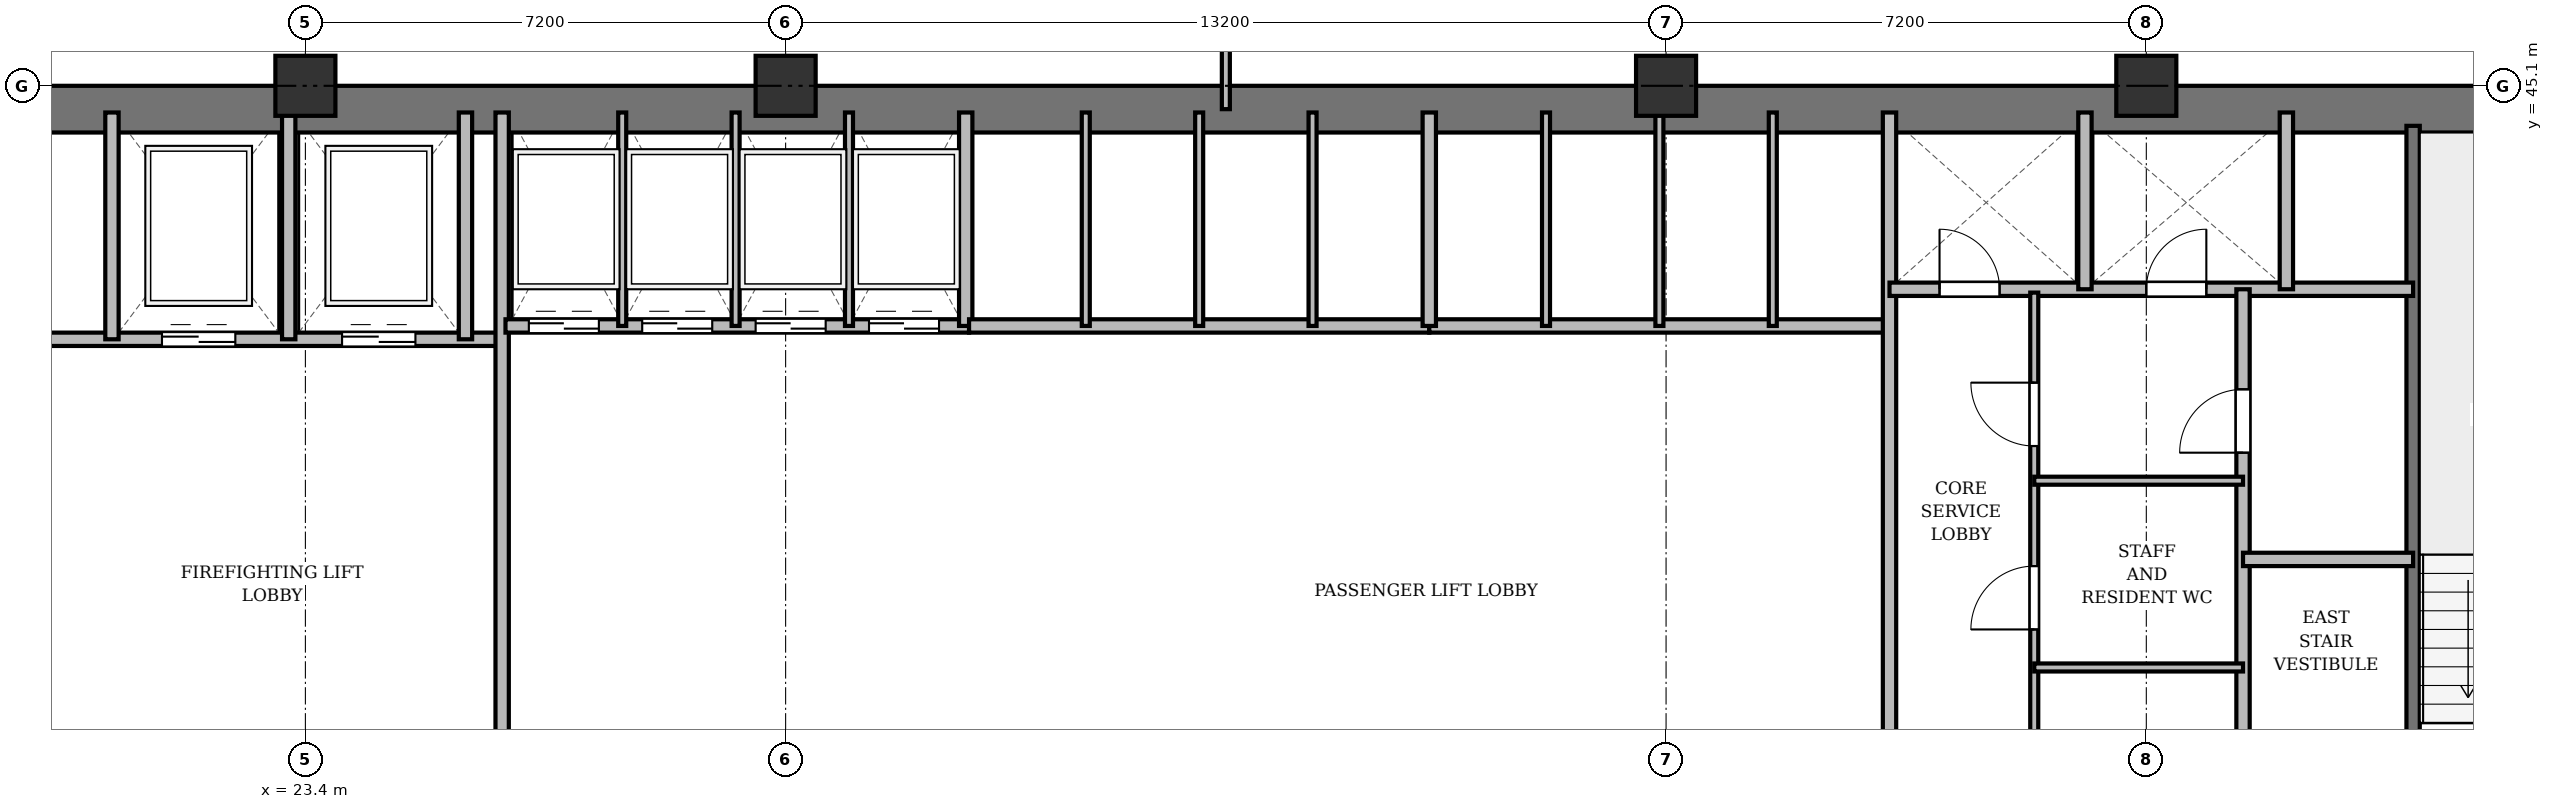
"""IFC4 building model, lengths in metres.
Left out: names, types, materials, properties, quantities, classifications, styles, units other than length and angle.
Written with IfcOpenShell. Run it as: python <this file> out.ifc"""

import sys

from ifc_helpers import new_model, si_unit, direction, frame, frame_2d, origin, origin_2d, place, context, subcontext, project, spatial, rectangle, extrude, source, transform, mapped, element, fill, save


model = new_model("IFC4")
c1 = context("Model", 3, precision=1e-05, world=origin(), true_north=direction((0.0, 1.0)))
c2 = subcontext(c1, "Body", "Model", "MODEL_VIEW")
j1 = project(units=[si_unit("LENGTHUNIT", "METRE"), si_unit("PLANEANGLEUNIT", "RADIAN")], contexts=[c1])
p1 = place(None, origin())
s1 = spatial("IfcSite", under=j1, at=p1, CompositionType="ELEMENT")
p2 = place(p1, origin())
s2 = spatial("IfcBuilding", under=s1, at=p2, CompositionType="ELEMENT")
p3 = place(p2, frame((0.0, 0.0, 30.7)))
s3 = spatial("IfcBuildingStorey", under=s2, at=p3, CompositionType="ELEMENT", Elevation=30.7)
m1 = source(origin(), c2, "Body", "SweptSolid", [
    extrude(rectangle(XDim=0.9, YDim=0.9, at=origin_2d()), origin(), (0.0, 0.0, 1.0), 3.6),
])
for number, where, z_axis, x_axis in (
    (1, (23.4, 45.1, 0.0), (0.0, 0.0, 1.0), (1.0, 0.0, 0.0)),
    (2, (30.6, 45.1, 0.0), (0.0, 0.0, 1.0), (1.0, 0.0, 0.0)),
    (3, (43.8, 45.1, 0.0), (0.0, 0.0, 1.0), (1.0, 0.0, 0.0)),
    (4, (51.0, 45.1, 0.0), (0.0, 0.0, 1.0), (1.0, 0.0, 0.0)),
):
    element("IfcColumn", number, at=place(p3, frame(where, z_axis=z_axis, x_axis=x_axis)), inside=s3, PredefinedType="COLUMN", context=c2, shape_type="MappedRepresentation", body=[
        mapped(m1, transform((0.0, 0.0, 0.0), x_axis=(1.0, 0.0, 0.0), y_axis=(0.0, 1.0, 0.0), z_axis=(0.0, 0.0, 1.0), scale=1.0)),
    ])
p4 = place(p3, frame((15.5, 44.75, 0.0), z_axis=(0.0, 0.0, 1.0), x_axis=(1.0, 0.0, 0.0)))
e5 = element("IfcWall", 5, at=p4, inside=s3, PredefinedType="SHEAR", context=c2, shape_type="SweptSolid", body=[
    extrude(rectangle(XDim=43.4, YDim=0.7, at=frame_2d((21.7, 0.0))), origin(), (0.0, 0.0, 1.0), 3.34),
])
p5 = place(p3, frame((55.0, 33.4, 0.0), z_axis=(0.0, 0.0, 1.0), x_axis=(0.0, 1.0, 0.0)))
e6 = element("IfcWall", 6, at=p5, inside=s3, PredefinedType="SHEAR", context=c2, shape_type="SweptSolid", body=[
    extrude(rectangle(XDim=11.1, YDim=0.2, at=frame_2d((5.55, 0.0))), origin(), (0.0, 0.0, 1.0), 3.34),
])
p6 = place(p5, frame((0.85, 0.0, 0.0)))
e7 = element("IfcOpeningElement", 7, at=p6, cuts=e6, PredefinedType="OPENING", context=c2, shape_type="SweptSolid", body=[
    extrude(rectangle(XDim=1.1, YDim=2.15, at=frame_2d((0.55, 1.075))), frame((0.0, 0.11, 0.0), z_axis=(0.0, -1.0, 0.0), x_axis=(1.0, 0.0, 0.0)), (0.0, 0.0, 1.0), 0.22),
])
p7 = place(p3, frame((19.55, 41.3, 0.0), z_axis=(0.0, 0.0, 1.0), x_axis=(1.0, 0.0, 0.0)))
e8 = element("IfcWall", 8, at=p7, inside=s3, PredefinedType="SOLIDWALL", context=c2, shape_type="SweptSolid", body=[
    extrude(rectangle(XDim=6.75, YDim=0.2, at=frame_2d((3.375, 0.0))), origin(), (0.0, 0.0, 1.0), 3.34),
])
p8 = place(p7, frame((1.7, 0.0, 0.0)))
e9 = element("IfcOpeningElement", 9, at=p8, cuts=e8, PredefinedType="OPENING", context=c2, shape_type="SweptSolid", body=[
    extrude(rectangle(XDim=1.1, YDim=2.15, at=frame_2d((0.55, 1.075))), frame((0.0, 0.11, 0.0), z_axis=(0.0, -1.0, 0.0), x_axis=(1.0, 0.0, 0.0)), (0.0, 0.0, 1.0), 0.22),
])
p9 = place(p7, frame((4.4, 0.0, 0.0)))
e10 = element("IfcOpeningElement", 10, at=p9, cuts=e8, PredefinedType="OPENING", context=c2, shape_type="SweptSolid", body=[
    extrude(rectangle(XDim=1.1, YDim=2.15, at=frame_2d((0.55, 1.075))), frame((0.0, 0.11, 0.0), z_axis=(0.0, -1.0, 0.0), x_axis=(1.0, 0.0, 0.0)), (0.0, 0.0, 1.0), 0.22),
])
for number, where, z_axis, x_axis in (
    (11, (20.5, 41.3, 0.0), (0.0, 0.0, 1.0), (0.0, 1.0, 0.0)),
    (12, (23.15, 41.3, 0.0), (0.0, 0.0, 1.0), (0.0, 1.0, 0.0)),
    (13, (25.8, 41.3, 0.0), (0.0, 0.0, 1.0), (0.0, 1.0, 0.0)),
):
    element("IfcWall", number, at=place(p3, frame(where, z_axis=z_axis, x_axis=x_axis)), inside=s3, PredefinedType="SOLIDWALL", context=c2, shape_type="SweptSolid", body=[
        extrude(rectangle(XDim=3.4, YDim=0.2, at=frame_2d((1.7, 0.0))), origin(), (0.0, 0.0, 1.0), 3.34),
    ])
p10 = place(p3, frame((26.35, 33.4, 0.0), z_axis=(0.0, 0.0, 1.0), x_axis=(0.0, 1.0, 0.0)))
e14 = element("IfcWall", 14, at=p10, inside=s3, PredefinedType="SOLIDWALL", context=c2, shape_type="SweptSolid", body=[
    extrude(rectangle(XDim=11.3, YDim=0.2, at=frame_2d((5.65, 0.0))), origin(), (0.0, 0.0, 1.0), 2.69),
])
p11 = place(p3, frame((26.4, 41.5, 0.0), z_axis=(0.0, 0.0, 1.0), x_axis=(1.0, 0.0, 0.0)))
e15 = element("IfcWall", 15, at=p11, inside=s3, PredefinedType="SOLIDWALL", context=c2, shape_type="SweptSolid", body=[
    extrude(rectangle(XDim=6.95, YDim=0.2, at=frame_2d((3.475, 0.0))), origin(), (0.0, 0.0, 1.0), 3.34),
])
p12 = place(p11, frame((0.35, 0.0, 0.0)))
e16 = element("IfcOpeningElement", 16, at=p12, cuts=e15, PredefinedType="OPENING", context=c2, shape_type="SweptSolid", body=[
    extrude(rectangle(XDim=1.05, YDim=2.15, at=frame_2d((0.525, 1.075))), frame((0.0, 0.11, 0.0), z_axis=(0.0, -1.0, 0.0), x_axis=(1.0, 0.0, 0.0)), (0.0, 0.0, 1.0), 0.22),
])
p13 = place(p11, frame((2.05, 0.0, 0.0)))
e17 = element("IfcOpeningElement", 17, at=p13, cuts=e15, PredefinedType="OPENING", context=c2, shape_type="SweptSolid", body=[
    extrude(rectangle(XDim=1.05, YDim=2.15, at=frame_2d((0.525, 1.075))), frame((0.0, 0.11, 0.0), z_axis=(0.0, -1.0, 0.0), x_axis=(1.0, 0.0, 0.0)), (0.0, 0.0, 1.0), 0.22),
])
p14 = place(p11, frame((3.75, 0.0, 0.0)))
e18 = element("IfcOpeningElement", 18, at=p14, cuts=e15, PredefinedType="OPENING", context=c2, shape_type="SweptSolid", body=[
    extrude(rectangle(XDim=1.05, YDim=2.15, at=frame_2d((0.525, 1.075))), frame((0.0, 0.11, 0.0), z_axis=(0.0, -1.0, 0.0), x_axis=(1.0, 0.0, 0.0)), (0.0, 0.0, 1.0), 0.22),
])
p15 = place(p11, frame((5.45, 0.0, 0.0)))
e19 = element("IfcOpeningElement", 19, at=p15, cuts=e15, PredefinedType="OPENING", context=c2, shape_type="SweptSolid", body=[
    extrude(rectangle(XDim=1.05, YDim=2.15, at=frame_2d((0.525, 1.075))), frame((0.0, 0.11, 0.0), z_axis=(0.0, -1.0, 0.0), x_axis=(1.0, 0.0, 0.0)), (0.0, 0.0, 1.0), 0.22),
])
p16 = place(p3, frame((33.3, 41.5, 0.0), z_axis=(0.0, 0.0, 1.0), x_axis=(0.0, 1.0, 0.0)))
e20 = element("IfcWall", 20, at=p16, inside=s3, PredefinedType="SOLIDWALL", context=c2, shape_type="SweptSolid", body=[
    extrude(rectangle(XDim=3.2, YDim=0.2, at=frame_2d((1.6, 0.0))), origin(), (0.0, 0.0, 1.0), 3.34),
])
for number, where, z_axis, x_axis in (
    (21, (28.15, 41.5, 0.0), (0.0, 0.0, 1.0), (0.0, 1.0, 0.0)),
    (22, (29.85, 41.5, 0.0), (0.0, 0.0, 1.0), (0.0, 1.0, 0.0)),
    (23, (31.55, 41.5, 0.0), (0.0, 0.0, 1.0), (0.0, 1.0, 0.0)),
):
    element("IfcWall", number, at=place(p3, frame(where, z_axis=z_axis, x_axis=x_axis)), inside=s3, PredefinedType="PARTITIONING", context=c2, shape_type="SweptSolid", body=[
        extrude(rectangle(XDim=3.2, YDim=0.12, at=frame_2d((1.6, 0.0))), origin(), (0.0, 0.0, 1.0), 3.34),
    ])
p17 = place(p3, frame((33.35, 41.5, 0.0), z_axis=(0.0, 0.0, 1.0), x_axis=(1.0, 0.0, 0.0)))
e24 = element("IfcWall", 24, at=p17, inside=s3, PredefinedType="SOLIDWALL", context=c2, shape_type="SweptSolid", body=[
    extrude(rectangle(XDim=6.9, YDim=0.2, at=frame_2d((3.45, 0.0))), origin(), (0.0, 0.0, 1.0), 3.34),
])
for number, where, z_axis, x_axis in (
    (25, (35.1, 41.5, 0.0), (0.0, 0.0, 1.0), (0.0, 1.0, 0.0)),
    (26, (36.8, 41.5, 0.0), (0.0, 0.0, 1.0), (0.0, 1.0, 0.0)),
    (27, (38.5, 41.5, 0.0), (0.0, 0.0, 1.0), (0.0, 1.0, 0.0)),
):
    element("IfcWall", number, at=place(p3, frame(where, z_axis=z_axis, x_axis=x_axis)), inside=s3, PredefinedType="PARTITIONING", context=c2, shape_type="SweptSolid", body=[
        extrude(rectangle(XDim=3.2, YDim=0.12, at=frame_2d((1.6, 0.0))), origin(), (0.0, 0.0, 1.0), 3.34),
    ])
p18 = place(p3, frame((40.25, 41.5, 0.0), z_axis=(0.0, 0.0, 1.0), x_axis=(1.0, 0.0, 0.0)))
e28 = element("IfcWall", 28, at=p18, inside=s3, PredefinedType="SOLIDWALL", context=c2, shape_type="SweptSolid", body=[
    extrude(rectangle(XDim=6.9, YDim=0.2, at=frame_2d((3.45, 0.0))), origin(), (0.0, 0.0, 1.0), 2.752),
])
p19 = place(p3, frame((40.25, 41.5, 0.0), z_axis=(0.0, 0.0, 1.0), x_axis=(0.0, 1.0, 0.0)))
e29 = element("IfcWall", 29, at=p19, inside=s3, PredefinedType="SOLIDWALL", context=c2, shape_type="SweptSolid", body=[
    extrude(rectangle(XDim=3.2, YDim=0.2, at=frame_2d((1.6, 0.0))), origin(), (0.0, 0.0, 1.0), 3.34),
])
p20 = place(p3, frame((42.0, 41.5, 0.0), z_axis=(0.0, 0.0, 1.0), x_axis=(0.0, 1.0, 0.0)))
e30 = element("IfcWall", 30, at=p20, inside=s3, PredefinedType="PARTITIONING", context=c2, shape_type="SweptSolid", body=[
    extrude(rectangle(XDim=3.2, YDim=0.12, at=frame_2d((1.6, 0.0))), origin(), (0.0, 0.0, 1.0), 3.34),
])
p21 = place(p3, frame((43.7, 41.5, 0.0), z_axis=(0.0, 0.0, 1.0), x_axis=(0.0, 1.0, 0.0)))
e31 = element("IfcWall", 31, at=p21, inside=s3, PredefinedType="PARTITIONING", context=c2, shape_type="SweptSolid", body=[
    extrude(rectangle(XDim=3.2, YDim=0.12, at=frame_2d((1.6, 0.0))), origin(), (0.0, 0.0, 1.0), 2.752),
])
p22 = place(p3, frame((45.4, 41.5, 0.0), z_axis=(0.0, 0.0, 1.0), x_axis=(0.0, 1.0, 0.0)))
e32 = element("IfcWall", 32, at=p22, inside=s3, PredefinedType="PARTITIONING", context=c2, shape_type="SweptSolid", body=[
    extrude(rectangle(XDim=3.2, YDim=0.12, at=frame_2d((1.6, 0.0))), origin(), (0.0, 0.0, 1.0), 3.34),
])
p23 = place(p3, frame((47.15, 33.4, 0.0), z_axis=(0.0, 0.0, 1.0), x_axis=(0.0, 1.0, 0.0)))
e33 = element("IfcWall", 33, at=p23, inside=s3, PredefinedType="SOLIDWALL", context=c2, shape_type="SweptSolid", body=[
    extrude(rectangle(XDim=11.3, YDim=0.2, at=frame_2d((5.65, 0.0))), origin(), (0.0, 0.0, 1.0), 2.69),
])
p24 = place(p3, frame((47.15, 42.05, 0.0), z_axis=(0.0, 0.0, 1.0), x_axis=(1.0, 0.0, 0.0)))
e34 = element("IfcWall", 34, at=p24, inside=s3, PredefinedType="SOLIDWALL", context=c2, shape_type="SweptSolid", body=[
    extrude(rectangle(XDim=7.85, YDim=0.2, at=frame_2d((3.925, 0.0))), origin(), (0.0, 0.0, 1.0), 2.752),
])
p25 = place(p24, frame((0.75, 0.0, 0.0)))
e35 = element("IfcOpeningElement", 35, at=p25, cuts=e34, PredefinedType="OPENING", context=c2, shape_type="SweptSolid", body=[
    extrude(rectangle(XDim=0.9, YDim=2.1, at=frame_2d((0.45, 1.05))), frame((0.0, 0.11, 0.0), z_axis=(0.0, -1.0, 0.0), x_axis=(1.0, 0.0, 0.0)), (0.0, 0.0, 1.0), 0.22),
])
p26 = place(p24, frame((3.85, 0.0, 0.0)))
e36 = element("IfcOpeningElement", 36, at=p26, cuts=e34, PredefinedType="OPENING", context=c2, shape_type="SweptSolid", body=[
    extrude(rectangle(XDim=0.9, YDim=2.1, at=frame_2d((0.45, 1.05))), frame((0.0, 0.11, 0.0), z_axis=(0.0, -1.0, 0.0), x_axis=(1.0, 0.0, 0.0)), (0.0, 0.0, 1.0), 0.22),
])
for number, where, z_axis, x_axis in (
    (37, (50.08, 42.05, 0.0), (0.0, 0.0, 1.0), (0.0, 1.0, 0.0)),
    (38, (53.1, 42.05, 0.0), (0.0, 0.0, 1.0), (0.0, 1.0, 0.0)),
):
    element("IfcWall", number, at=place(p3, frame(where, z_axis=z_axis, x_axis=x_axis)), inside=s3, PredefinedType="SOLIDWALL", context=c2, shape_type="SweptSolid", body=[
        extrude(rectangle(XDim=2.65, YDim=0.2, at=frame_2d((1.325, 0.0))), origin(), (0.0, 0.0, 1.0), 3.34),
    ])
p27 = place(p3, frame((52.45, 33.4, 0.0), z_axis=(0.0, 0.0, 1.0), x_axis=(0.0, 1.0, 0.0)))
e39 = element("IfcWall", 39, at=p27, inside=s3, PredefinedType="PARTITIONING", context=c2, shape_type="SweptSolid", body=[
    extrude(rectangle(XDim=8.65, YDim=0.2, at=frame_2d((4.325, 0.0))), origin(), (0.0, 0.0, 1.0), 2.69),
])
p28 = place(p27, frame((6.2, 0.0, 0.0)))
e40 = element("IfcOpeningElement", 40, at=p28, cuts=e39, PredefinedType="OPENING", context=c2, shape_type="SweptSolid", body=[
    extrude(rectangle(XDim=0.95, YDim=2.15, at=frame_2d((0.475, 1.075))), frame((0.0, 0.11, 0.0), z_axis=(0.0, -1.0, 0.0), x_axis=(1.0, 0.0, 0.0)), (0.0, 0.0, 1.0), 0.22),
])
p29 = place(p3, frame((52.45, 38.0, 0.0), z_axis=(0.0, 0.0, 1.0), x_axis=(1.0, 0.0, 0.0)))
e41 = element("IfcWall", 41, at=p29, inside=s3, PredefinedType="PARTITIONING", context=c2, shape_type="SweptSolid", body=[
    extrude(rectangle(XDim=2.55, YDim=0.2, at=frame_2d((1.275, 0.0))), origin(), (0.0, 0.0, 1.0), 3.34),
])
p30 = place(p3, frame((49.32, 33.4, 0.0), z_axis=(0.0, 0.0, 1.0), x_axis=(0.0, 1.0, 0.0)))
e42 = element("IfcWall", 42, at=p30, inside=s3, PredefinedType="PARTITIONING", context=c2, shape_type="SweptSolid", body=[
    extrude(rectangle(XDim=8.6, YDim=0.12, at=frame_2d((4.3, 0.0))), origin(), (0.0, 0.0, 1.0), 2.69),
])
p31 = place(p30, frame((0.85, 0.0, 0.0)))
e43 = element("IfcOpeningElement", 43, at=p31, cuts=e42, PredefinedType="OPENING", context=c2, shape_type="SweptSolid", body=[
    extrude(rectangle(XDim=0.95, YDim=2.15, at=frame_2d((0.475, 1.075))), frame((0.0, 0.07, 0.0), z_axis=(0.0, -1.0, 0.0), x_axis=(1.0, 0.0, 0.0)), (0.0, 0.0, 1.0), 0.14),
])
p32 = place(p30, frame((3.55, 0.0, 0.0)))
e44 = element("IfcOpeningElement", 44, at=p32, cuts=e42, PredefinedType="OPENING", context=c2, shape_type="SweptSolid", body=[
    extrude(rectangle(XDim=0.95, YDim=2.15, at=frame_2d((0.475, 1.075))), frame((0.0, 0.07, 0.0), z_axis=(0.0, -1.0, 0.0), x_axis=(1.0, 0.0, 0.0)), (0.0, 0.0, 1.0), 0.14),
])
p33 = place(p30, frame((6.3, 0.0, 0.0)))
e45 = element("IfcOpeningElement", 45, at=p33, cuts=e42, PredefinedType="OPENING", context=c2, shape_type="SweptSolid", body=[
    extrude(rectangle(XDim=0.95, YDim=2.15, at=frame_2d((0.475, 1.075))), frame((0.0, 0.07, 0.0), z_axis=(0.0, -1.0, 0.0), x_axis=(1.0, 0.0, 0.0)), (0.0, 0.0, 1.0), 0.14),
])
for number, where, z_axis, x_axis in (
    (46, (49.32, 36.38, 0.0), (0.0, 0.0, 1.0), (1.0, 0.0, 0.0)),
    (47, (49.32, 39.18, 0.0), (0.0, 0.0, 1.0), (1.0, 0.0, 0.0)),
):
    element("IfcWall", number, at=place(p3, frame(where, z_axis=z_axis, x_axis=x_axis)), inside=s3, PredefinedType="PARTITIONING", context=c2, shape_type="SweptSolid", body=[
        extrude(rectangle(XDim=3.13, YDim=0.12, at=frame_2d((1.565, 0.0))), origin(), (0.0, 0.0, 1.0), 2.752),
    ])
p34 = place(p3, frame((37.2, 44.75, 0.0), z_axis=(0.0, 0.0, 1.0), x_axis=(0.0, 1.0, 0.0)))
e48 = element("IfcWall", 48, at=p34, inside=s3, PredefinedType="PARTITIONING", context=c2, shape_type="SweptSolid", body=[
    extrude(rectangle(XDim=3.61, YDim=0.12, at=frame_2d((1.805, 0.0))), origin(), (0.0, 0.0, 1.0), 2.69),
])
p35 = place(p34, frame((1.1, 0.0, 0.0)))
e49 = element("IfcOpeningElement", 49, at=p35, cuts=e48, PredefinedType="OPENING", context=c2, shape_type="SweptSolid", body=[
    extrude(rectangle(XDim=0.95, YDim=2.15, at=frame_2d((0.475, 1.075))), frame((0.0, 0.07, 0.0), z_axis=(0.0, -1.0, 0.0), x_axis=(1.0, 0.0, 0.0)), (0.0, 0.0, 1.0), 0.14),
])
m2 = source(origin(), c2, "Body", "SweptSolid", [
    extrude(rectangle(XDim=1.1, YDim=2.15, at=frame_2d((0.55, 1.075))), frame((0.0, 0.025, 0.0), z_axis=(0.0, -1.0, 0.0), x_axis=(1.0, 0.0, 0.0)), (0.0, 0.0, 1.0), 0.05),
])
p36 = place(p8, origin())
e50 = element("IfcDoor", 50, at=p36, inside=s3, OperationType="DOUBLE_DOOR_SLIDING", PredefinedType="DOOR", context=c2, shape_type="MappedRepresentation", body=[
    mapped(m2, transform((0.0, 0.0, 0.0), x_axis=(1.0, 0.0, 0.0), y_axis=(0.0, 1.0, 0.0), z_axis=(0.0, 0.0, 1.0), scale=1.0)),
])
fill(e9, e50)
p37 = place(p9, origin())
e51 = element("IfcDoor", 51, at=p37, inside=s3, OperationType="DOUBLE_DOOR_SLIDING", PredefinedType="DOOR", context=c2, shape_type="MappedRepresentation", body=[
    mapped(m2, transform((0.0, 0.0, 0.0), x_axis=(1.0, 0.0, 0.0), y_axis=(0.0, 1.0, 0.0), z_axis=(0.0, 0.0, 1.0), scale=1.0)),
])
fill(e10, e51)
m3 = source(origin(), c2, "Body", "SweptSolid", [
    extrude(rectangle(XDim=1.05, YDim=2.15, at=frame_2d((0.525, 1.075))), frame((0.0, 0.025, 0.0), z_axis=(0.0, -1.0, 0.0), x_axis=(1.0, 0.0, 0.0)), (0.0, 0.0, 1.0), 0.05),
])
p38 = place(p12, origin())
e52 = element("IfcDoor", 52, at=p38, inside=s3, OperationType="DOUBLE_DOOR_SLIDING", PredefinedType="DOOR", context=c2, shape_type="MappedRepresentation", body=[
    mapped(m3, transform((0.0, 0.0, 0.0), x_axis=(1.0, 0.0, 0.0), y_axis=(0.0, 1.0, 0.0), z_axis=(0.0, 0.0, 1.0), scale=1.0)),
])
fill(e16, e52)
p39 = place(p13, origin())
e53 = element("IfcDoor", 53, at=p39, inside=s3, OperationType="DOUBLE_DOOR_SLIDING", PredefinedType="DOOR", context=c2, shape_type="MappedRepresentation", body=[
    mapped(m3, transform((0.0, 0.0, 0.0), x_axis=(1.0, 0.0, 0.0), y_axis=(0.0, 1.0, 0.0), z_axis=(0.0, 0.0, 1.0), scale=1.0)),
])
fill(e17, e53)
p40 = place(p14, origin())
e54 = element("IfcDoor", 54, at=p40, inside=s3, OperationType="DOUBLE_DOOR_SLIDING", PredefinedType="DOOR", context=c2, shape_type="MappedRepresentation", body=[
    mapped(m3, transform((0.0, 0.0, 0.0), x_axis=(1.0, 0.0, 0.0), y_axis=(0.0, 1.0, 0.0), z_axis=(0.0, 0.0, 1.0), scale=1.0)),
])
fill(e18, e54)
p41 = place(p15, origin())
e55 = element("IfcDoor", 55, at=p41, inside=s3, OperationType="DOUBLE_DOOR_SLIDING", PredefinedType="DOOR", context=c2, shape_type="MappedRepresentation", body=[
    mapped(m3, transform((0.0, 0.0, 0.0), x_axis=(1.0, 0.0, 0.0), y_axis=(0.0, 1.0, 0.0), z_axis=(0.0, 0.0, 1.0), scale=1.0)),
])
fill(e19, e55)
m4 = source(origin(), c2, "Body", "SweptSolid", [
    extrude(rectangle(XDim=0.9, YDim=2.1, at=frame_2d((0.45, 1.05))), frame((0.0, 0.025, 0.0), z_axis=(0.0, -1.0, 0.0), x_axis=(1.0, 0.0, 0.0)), (0.0, 0.0, 1.0), 0.05),
])
p42 = place(p25, origin())
e56 = element("IfcDoor", 56, at=p42, inside=s3, OperationType="SINGLE_SWING_LEFT", PredefinedType="DOOR", context=c2, shape_type="MappedRepresentation", body=[
    mapped(m4, transform((0.0, 0.0, 0.0), x_axis=(1.0, 0.0, 0.0), y_axis=(0.0, 1.0, 0.0), z_axis=(0.0, 0.0, 1.0), scale=1.0)),
])
fill(e35, e56)
p43 = place(p26, origin())
e57 = element("IfcDoor", 57, at=p43, inside=s3, OperationType="SINGLE_SWING_RIGHT", PredefinedType="DOOR", context=c2, shape_type="MappedRepresentation", body=[
    mapped(m4, transform((0.0, 0.0, 0.0), x_axis=(1.0, 0.0, 0.0), y_axis=(0.0, 1.0, 0.0), z_axis=(0.0, 0.0, 1.0), scale=1.0)),
])
fill(e36, e57)
m5 = source(origin(), c2, "Body", "SweptSolid", [
    extrude(rectangle(XDim=0.95, YDim=2.15, at=frame_2d((0.475, 1.075))), frame((0.0, 0.025, 0.0), z_axis=(0.0, -1.0, 0.0), x_axis=(1.0, 0.0, 0.0)), (0.0, 0.0, 1.0), 0.05),
])
p44 = place(p28, origin())
e58 = element("IfcDoor", 58, at=p44, inside=s3, OperationType="SINGLE_SWING_LEFT", PredefinedType="DOOR", context=c2, shape_type="MappedRepresentation", body=[
    mapped(m5, transform((0.0, 0.0, 0.0), x_axis=(1.0, 0.0, 0.0), y_axis=(0.0, 1.0, 0.0), z_axis=(0.0, 0.0, 1.0), scale=1.0)),
])
fill(e40, e58)
p45 = place(p32, origin())
e59 = element("IfcDoor", 59, at=p45, inside=s3, OperationType="SINGLE_SWING_LEFT", PredefinedType="DOOR", context=c2, shape_type="MappedRepresentation", body=[
    mapped(m5, transform((0.0, 0.0, 0.0), x_axis=(1.0, 0.0, 0.0), y_axis=(0.0, 1.0, 0.0), z_axis=(0.0, 0.0, 1.0), scale=1.0)),
])
fill(e44, e59)
p46 = place(p33, origin())
e60 = element("IfcDoor", 60, at=p46, inside=s3, OperationType="SINGLE_SWING_RIGHT", PredefinedType="DOOR", context=c2, shape_type="MappedRepresentation", body=[
    mapped(m5, transform((0.0, 0.0, 0.0), x_axis=(1.0, 0.0, 0.0), y_axis=(0.0, 1.0, 0.0), z_axis=(0.0, 0.0, 1.0), scale=1.0)),
])
fill(e45, e60)
save(model, sys.argv[1])
